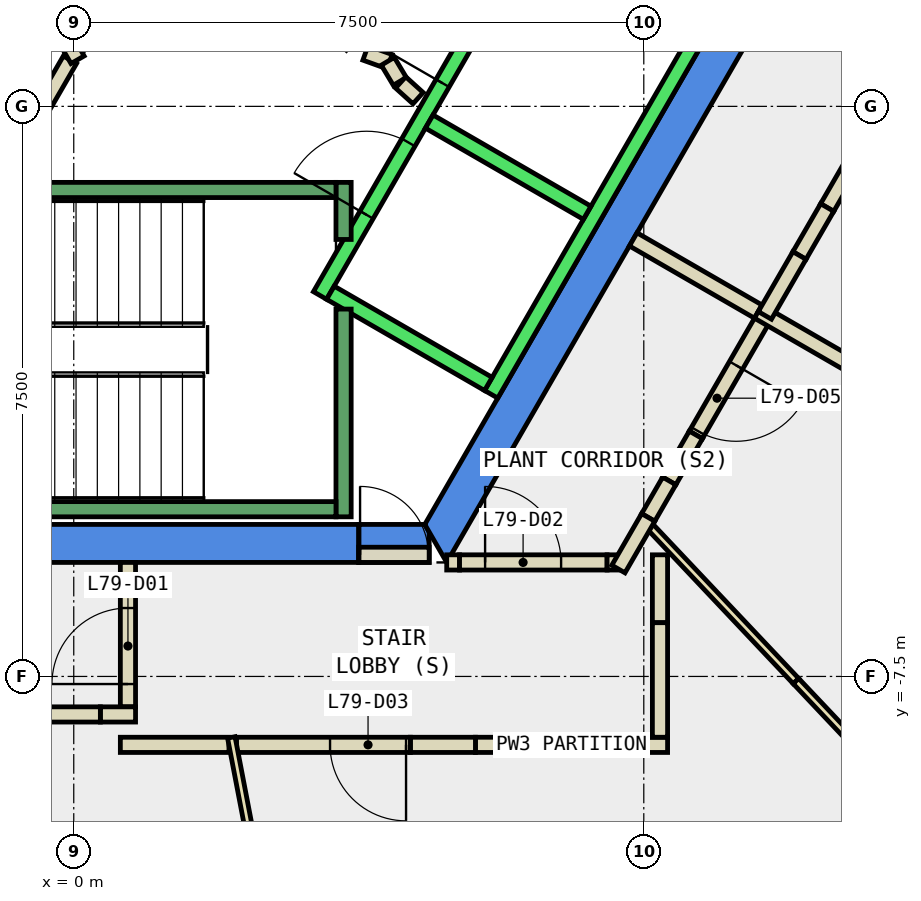
"""IFC4 building model, lengths in metres.
Left out: names, types, materials, properties, quantities, classifications, styles, units other than length and angle.
Written with IfcOpenShell. Run it as: python <this file> out.ifc"""

import sys

from ifc_helpers import new_model, si_unit, direction, frame, frame_2d, origin, place, context, subcontext, project, spatial, polyline, rectangle, outline, extrude, element, fill, save


model = new_model("IFC4")
c1 = context("Model", 3, precision=1e-05, world=origin(), true_north=direction((0.0, 1.0)))
c2 = subcontext(c1, "Body", "Model", "MODEL_VIEW")
j1 = project(units=[si_unit("LENGTHUNIT", "METRE"), si_unit("PLANEANGLEUNIT", "RADIAN")], contexts=[c1])
p1 = place(None, origin())
s1 = spatial("IfcSite", under=j1, at=p1, CompositionType="ELEMENT")
p2 = place(p1, origin())
s2 = spatial("IfcBuilding", under=s1, at=p2, CompositionType="ELEMENT")
p3 = place(p2, frame((0.0, 0.0, 335.9)))
s3 = spatial("IfcBuildingStorey", under=s2, at=p3, CompositionType="ELEMENT", Elevation=335.9)
p4 = place(p3, frame((0.0, 0.0, -0.35)))
e1 = element("IfcWall", 1, at=p4, inside=s3, PredefinedType="SHEAR", context=c2, shape_type="SweptSolid", body=[
    extrude(outline(polyline([(3.75, -6.0), (3.75, -5.5), (-4.619, -5.5), (-4.907, -6.0), (3.75, -6.0)])), origin(), (0.0, 0.0, 1.0), 4.4),
])
p5 = place(p3, frame((0.0, 0.0, 3.6)))
e2 = element("IfcWall", 2, at=p5, inside=s3, PredefinedType="SHEAR", context=c2, shape_type="SweptSolid", body=[
    extrude(outline(polyline([(4.676, -6.0), (4.676, -5.6), (4.619, -5.5), (3.75, -5.5), (3.75, -6.0), (4.676, -6.0)])), origin(), (0.0, 0.0, 1.0), 0.45),
])
p6 = place(p3, frame((0.0, 0.0, -0.35)))
e3 = element("IfcWall", 3, at=p6, inside=s3, PredefinedType="SHEAR", context=c2, shape_type="SweptSolid", body=[
    extrude(outline(polyline([(4.907, -6.0), (9.815, 2.5), (9.238, 2.5), (4.619, -5.5), (4.907, -6.0)])), origin(), (0.0, 0.0, 1.0), 4.4),
])
p7 = place(p3, frame((-0.982, -1.0, 0.0), z_axis=(0.0, 0.0, 1.0), x_axis=(0.50024047865, 0.865886518847, 0.0)))
e4 = element("IfcWall", 4, at=p7, inside=s3, PredefinedType="PARTITIONING", context=c2, shape_type="SweptSolid", body=[
    extrude(rectangle(XDim=1.863, YDim=0.2, at=frame_2d((0.931, 0.0))), origin(), (0.0, 0.0, 1.0), 4.05),
])
p8 = place(p3, frame((3.838, 0.702, 0.0), z_axis=(0.0, 0.0, 1.0), x_axis=(0.941035081519, -0.338308993895, 0.0)))
e5 = element("IfcWall", 5, at=p8, inside=s3, PredefinedType="PARTITIONING", context=c2, shape_type="SweptSolid", body=[
    extrude(rectangle(XDim=0.337, YDim=0.2, at=frame_2d((0.168, 0.0))), origin(), (0.0, 0.0, 1.0), 4.05),
])
p9 = place(p3, frame((4.132, 0.593, 0.0), z_axis=(0.0, 0.0, 1.0), x_axis=(0.513561617048, -0.858052717201, 0.0)))
e6 = element("IfcWall", 6, at=p9, inside=s3, PredefinedType="PARTITIONING", context=c2, shape_type="SweptSolid", body=[
    extrude(rectangle(XDim=0.308, YDim=0.2, at=frame_2d((0.154, 0.0))), origin(), (0.0, 0.0, 1.0), 4.05),
])
p10 = place(p3, frame((4.301, 0.315, 0.0), z_axis=(0.0, 0.0, 1.0), x_axis=(0.741798017506, -0.670623367639, 0.0)))
e7 = element("IfcWall", 7, at=p10, inside=s3, PredefinedType="PARTITIONING", context=c2, shape_type="SweptSolid", body=[
    extrude(rectangle(XDim=0.309, YDim=0.2, at=frame_2d((0.154, 0.0))), origin(), (0.0, 0.0, 1.0), 4.05),
])
p11 = place(p3, frame((-2.54, 5.1, 0.0), z_axis=(0.0, 0.0, 1.0), x_axis=(0.499925051871, -0.866068670783, 0.0)))
e8 = element("IfcWall", 8, at=p11, inside=s3, PredefinedType="PARTITIONING", context=c2, shape_type="SweptSolid", body=[
    extrude(rectangle(XDim=5.181, YDim=0.2, at=frame_2d((2.59, 0.0))), origin(), (0.0, 0.0, 1.0), 4.05),
])
p12 = place(p11, frame((2.04, 0.0, 0.0)))
e9 = element("IfcOpeningElement", 9, at=p12, cuts=e8, PredefinedType="OPENING", context=c2, shape_type="SweptSolid", body=[
    extrude(rectangle(XDim=1.0, YDim=2.1, at=frame_2d((0.5, 1.05))), frame((0.0, 0.11, 0.0), z_axis=(0.0, -1.0, 0.0), x_axis=(1.0, 0.0, 0.0)), (0.0, 0.0, 1.0), 0.22),
])
p13 = place(p3, frame((0.713, -7.9, 0.0), z_axis=(0.0, 0.0, 1.0), x_axis=(0.0, 1.0, 0.0)))
e10 = element("IfcWall", 10, at=p13, inside=s3, PredefinedType="PARTITIONING", context=c2, shape_type="SweptSolid", body=[
    extrude(rectangle(XDim=1.9, YDim=0.2, at=frame_2d((0.95, 0.0))), origin(), (0.0, 0.0, 1.0), 4.05),
])
p14 = place(p13, frame((0.3, 0.0, 0.0)))
e11 = element("IfcOpeningElement", 11, at=p14, cuts=e10, PredefinedType="OPENING", context=c2, shape_type="SweptSolid", body=[
    extrude(rectangle(XDim=1.0, YDim=2.1, at=frame_2d((0.5, 1.05))), frame((0.0, 0.11, 0.0), z_axis=(0.0, -1.0, 0.0), x_axis=(1.0, 0.0, 0.0)), (0.0, 0.0, 1.0), 0.22),
])
p15 = place(p3, frame((4.907, -6.0, 0.0), z_axis=(0.0, 0.0, 1.0), x_axis=(1.0, 0.0, 0.0)))
e12 = element("IfcWall", 12, at=p15, inside=s3, PredefinedType="PARTITIONING", context=c2, shape_type="SweptSolid", body=[
    extrude(rectangle(XDim=0.169, YDim=0.2, at=frame_2d((0.084, 0.0))), origin(), (0.0, 0.0, 1.0), 2.4),
])
p16 = place(p3, frame((7.813, -8.4, 0.0), z_axis=(0.0, 0.0, 1.0), x_axis=(-1.0, 0.0, 0.0)))
e13 = element("IfcWall", 13, at=p16, inside=s3, PredefinedType="PARTITIONING", context=c2, shape_type="SweptSolid", body=[
    extrude(rectangle(XDim=2.528, YDim=0.2, at=frame_2d((1.264, 0.0))), origin(), (0.0, 0.0, 1.0), 4.05),
])
p17 = place(p3, frame((7.713, -5.9, 0.0), z_axis=(0.0, 0.0, 1.0), x_axis=(0.0, -1.0, 0.0)))
e14 = element("IfcWall", 14, at=p17, inside=s3, PredefinedType="PARTITIONING", context=c2, shape_type="SweptSolid", body=[
    extrude(rectangle(XDim=0.893, YDim=0.2, at=frame_2d((0.447, 0.0))), origin(), (0.0, 0.0, 1.0), 1.95),
])
p18 = place(p3, frame((2.042, -8.4, 0.0), z_axis=(0.0, 0.0, 1.0), x_axis=(-1.0, 0.0, 0.0)))
e15 = element("IfcWall", 15, at=p18, inside=s3, PredefinedType="PARTITIONING", context=c2, shape_type="SweptSolid", body=[
    extrude(rectangle(XDim=1.429, YDim=0.2, at=frame_2d((0.714, 0.0))), origin(), (0.0, 0.0, 1.0), 4.05),
])
p19 = place(p3, frame((0.813, -8.0, 0.0), z_axis=(0.0, 0.0, 1.0), x_axis=(-1.0, 0.0, 0.0)))
e16 = element("IfcWall", 16, at=p19, inside=s3, PredefinedType="PARTITIONING", context=c2, shape_type="SweptSolid", body=[
    extrude(rectangle(XDim=0.463, YDim=0.2, at=frame_2d((0.231, 0.0))), origin(), (0.0, 0.0, 1.0), 4.05),
])
p20 = place(p3, frame((9.093, -2.75, 0.0), z_axis=(0.0, 0.0, 1.0), x_axis=(-0.500145398563, -0.865941441609, 0.0)))
e17 = element("IfcWall", 17, at=p20, inside=s3, PredefinedType="PARTITIONING", context=c2, shape_type="SweptSolid", body=[
    extrude(rectangle(XDim=1.815, YDim=0.2, at=frame_2d((0.908, 0.0))), origin(), (0.0, 0.0, 1.0), 4.05),
])
p21 = place(p20, frame((0.758, 0.0, 0.0)))
e18 = element("IfcOpeningElement", 18, at=p21, cuts=e17, PredefinedType="OPENING", context=c2, shape_type="SweptSolid", body=[
    extrude(rectangle(XDim=1.0, YDim=2.1, at=frame_2d((0.5, 1.05))), frame((0.0, 0.11, 0.0), z_axis=(0.0, -1.0, 0.0), x_axis=(1.0, 0.0, 0.0)), (0.0, 0.0, 1.0), 0.22),
])
p22 = place(p3, frame((7.361, -1.75, 0.0), z_axis=(0.0, 0.0, 1.0), x_axis=(0.865980106173, -0.500078449558, 0.0)))
e19 = element("IfcWall", 19, at=p22, inside=s3, PredefinedType="PARTITIONING", context=c2, shape_type="SweptSolid", body=[
    extrude(rectangle(XDim=1.9, YDim=0.2, at=frame_2d((0.95, 0.0))), origin(), (0.0, 0.0, 1.0), 4.05),
])
p23 = place(p3, frame((7.524, -5.467, 0.0), z_axis=(0.0, 0.0, 1.0), x_axis=(0.686690726235, -0.726949686363, 0.0)))
e20 = element("IfcWall", 20, at=p23, inside=s3, PredefinedType="PARTITIONING", context=c2, shape_type="SweptSolid", body=[
    extrude(rectangle(XDim=2.881, YDim=0.1, at=frame_2d((1.44, 0.0))), origin(), (0.0, 0.0, 1.0), 1.95),
])
p24 = place(p3, frame((9.006, -2.7, 0.0), z_axis=(0.0, 0.0, 1.0), x_axis=(0.86601643423, -0.500015535402, 0.0)))
e21 = element("IfcWall", 21, at=p24, inside=s3, PredefinedType="PARTITIONING", context=c2, shape_type="SweptSolid", body=[
    extrude(rectangle(XDim=13.147, YDim=0.2, at=frame_2d((6.574, 0.0))), origin(), (0.0, 0.0, 1.0), 4.05),
])
p25 = place(p3, frame((3.75, -5.9, 0.0), z_axis=(0.0, 0.0, 1.0), x_axis=(1.0, 0.0, 0.0)))
e22 = element("IfcWall", 22, at=p25, inside=s3, PredefinedType="PARTITIONING", context=c2, shape_type="SweptSolid", body=[
    extrude(rectangle(XDim=0.926, YDim=0.2, at=frame_2d((0.463, 0.0))), origin(), (0.0, 0.0, 1.0), 2.4),
])
p26 = place(p25, frame((0.017, 0.0, 0.0)))
e23 = element("IfcOpeningElement", 23, at=p26, cuts=e22, PredefinedType="OPENING", context=c2, shape_type="SweptSolid", body=[
    extrude(rectangle(XDim=0.9, YDim=2.1, at=frame_2d((0.45, 1.05))), frame((0.0, 0.11, 0.0), z_axis=(0.0, -1.0, 0.0), x_axis=(1.0, 0.0, 0.0)), (0.0, 0.0, 1.0), 0.22),
])
p27 = place(p3, frame((5.076, -6.0, 0.0), z_axis=(0.0, 0.0, 1.0), x_axis=(1.0, 0.0, 0.0)))
e24 = element("IfcWall", 24, at=p27, inside=s3, PredefinedType="PARTITIONING", context=c2, shape_type="SweptSolid", body=[
    extrude(rectangle(XDim=1.941, YDim=0.2, at=frame_2d((0.971, 0.0))), origin(), (0.0, 0.0, 1.0), 4.05),
])
p28 = place(p27, frame((0.336, 0.0, 0.0)))
e25 = element("IfcOpeningElement", 25, at=p28, cuts=e24, PredefinedType="OPENING", context=c2, shape_type="SweptSolid", body=[
    extrude(rectangle(XDim=1.0, YDim=2.1, at=frame_2d((0.5, 1.05))), frame((0.0, 0.11, 0.0), z_axis=(0.0, -1.0, 0.0), x_axis=(1.0, 0.0, 0.0)), (0.0, 0.0, 1.0), 0.22),
])
p29 = place(p3, frame((7.017, -6.0, 0.0), z_axis=(0.0, 0.0, 1.0), x_axis=(1.0, 0.0, 0.0)))
e26 = element("IfcWall", 26, at=p29, inside=s3, PredefinedType="PARTITIONING", context=c2, shape_type="SweptSolid", body=[
    extrude(rectangle(XDim=0.144, YDim=0.2, at=frame_2d((0.072, 0.0))), origin(), (0.0, 0.0, 1.0), 1.95),
])
p30 = place(p3, frame((5.285, -8.4, 0.0), z_axis=(0.0, 0.0, 1.0), x_axis=(-1.0, 0.0, 0.0)))
e27 = element("IfcWall", 27, at=p30, inside=s3, PredefinedType="PARTITIONING", context=c2, shape_type="SweptSolid", body=[
    extrude(rectangle(XDim=0.856, YDim=0.2, at=frame_2d((0.428, 0.0))), origin(), (0.0, 0.0, 1.0), 1.95),
])
p31 = place(p3, frame((4.429, -8.4, 0.0), z_axis=(0.0, 0.0, 1.0), x_axis=(-1.0, 0.0, 0.0)))
e28 = element("IfcWall", 28, at=p31, inside=s3, PredefinedType="PARTITIONING", context=c2, shape_type="SweptSolid", body=[
    extrude(rectangle(XDim=2.287, YDim=0.2, at=frame_2d((1.144, 0.0))), origin(), (0.0, 0.0, 1.0), 4.05),
])
p32 = place(p31, frame((0.057, 0.0, 0.0)))
e29 = element("IfcOpeningElement", 29, at=p32, cuts=e28, PredefinedType="OPENING", context=c2, shape_type="SweptSolid", body=[
    extrude(rectangle(XDim=1.0, YDim=2.1, at=frame_2d((0.5, 1.05))), frame((0.0, 0.11, 0.0), z_axis=(0.0, -1.0, 0.0), x_axis=(1.0, 0.0, 0.0)), (0.0, 0.0, 1.0), 0.22),
])
p33 = place(p3, frame((7.713, -6.793, 0.0), z_axis=(0.0, 0.0, 1.0), x_axis=(0.0, -1.0, 0.0)))
e30 = element("IfcWall", 30, at=p33, inside=s3, PredefinedType="PARTITIONING", context=c2, shape_type="SweptSolid", body=[
    extrude(rectangle(XDim=1.507, YDim=0.2, at=frame_2d((0.753, 0.0))), origin(), (0.0, 0.0, 1.0), 4.05),
])
p34 = place(p3, frame((0.35, -8.0, 0.0), z_axis=(0.0, 0.0, 1.0), x_axis=(-1.0, 0.0, 0.0)))
e31 = element("IfcWall", 31, at=p34, inside=s3, PredefinedType="PARTITIONING", context=c2, shape_type="SweptSolid", body=[
    extrude(rectangle(XDim=0.7, YDim=0.2, at=frame_2d((0.35, 0.0))), origin(), (0.0, 0.0, 1.0), 1.95),
])
p35 = place(p3, frame((8.185, -4.322, 0.0), z_axis=(0.0, 0.0, 1.0), x_axis=(-0.500265973451, -0.865871789474, 0.0)))
e32 = element("IfcWall", 32, at=p35, inside=s3, PredefinedType="PARTITIONING", context=c2, shape_type="SweptSolid", body=[
    extrude(rectangle(XDim=0.7, YDim=0.2, at=frame_2d((0.35, 0.0))), origin(), (0.0, 0.0, 1.0), 1.95),
])
p36 = place(p3, frame((7.835, -4.928, 0.0), z_axis=(0.0, 0.0, 1.0), x_axis=(-0.499646164767, -0.866229594296, 0.0)))
e33 = element("IfcWall", 33, at=p36, inside=s3, PredefinedType="PARTITIONING", context=c2, shape_type="SweptSolid", body=[
    extrude(rectangle(XDim=0.554, YDim=0.2, at=frame_2d((0.277, 0.0))), origin(), (0.0, 0.0, 1.0), 4.05),
])
p37 = place(p3, frame((7.558, -5.408, 0.0), z_axis=(0.0, 0.0, 1.0), x_axis=(-0.500090821976, -0.865972961342, 0.0)))
e34 = element("IfcWall", 34, at=p37, inside=s3, PredefinedType="PARTITIONING", context=c2, shape_type="SweptSolid", body=[
    extrude(rectangle(XDim=0.784, YDim=0.2, at=frame_2d((0.392, 0.0))), origin(), (0.0, 0.0, 1.0), 1.95),
])
p38 = place(p3, frame((3.388, -15.153, 0.0), z_axis=(0.0, 0.0, 1.0), x_axis=(-0.18849172388, 0.982074778227, 0.0)))
e35 = element("IfcWall", 35, at=p38, inside=s3, PredefinedType="PARTITIONING", context=c2, shape_type="SweptSolid", body=[
    extrude(rectangle(XDim=6.976, YDim=0.1, at=frame_2d((3.488, 0.0))), origin(), (0.0, 0.0, 1.0), 4.05),
])
p39 = place(p3, frame((9.502, -7.561, 0.0), z_axis=(0.0, 0.0, 1.0), x_axis=(0.686701951344, -0.726939082744, 0.0)))
e36 = element("IfcWall", 36, at=p39, inside=s3, PredefinedType="PARTITIONING", context=c2, shape_type="SweptSolid", body=[
    extrude(rectangle(XDim=9.69, YDim=0.1, at=frame_2d((4.845, 0.0))), origin(), (0.0, 0.0, 1.0), 4.05),
])
p40 = place(p3, frame((11.138, 0.792, 0.0), z_axis=(0.0, 0.0, 1.0), x_axis=(-0.499728202161, -0.866182269482, 0.0)))
e37 = element("IfcWall", 37, at=p40, inside=s3, PredefinedType="PARTITIONING", context=c2, shape_type="SweptSolid", body=[
    extrude(rectangle(XDim=2.451, YDim=0.2, at=frame_2d((1.226, 0.0))), origin(), (0.0, 0.0, 1.0), 4.05),
])
p41 = place(p3, frame((9.913, -1.331, 0.0), z_axis=(0.0, 0.0, 1.0), x_axis=(-0.500785366854, -0.865571496957, 0.0)))
e38 = element("IfcWall", 38, at=p41, inside=s3, PredefinedType="PARTITIONING", context=c2, shape_type="SweptSolid", body=[
    extrude(rectangle(XDim=0.729, YDim=0.2, at=frame_2d((0.364, 0.0))), origin(), (0.0, 0.0, 1.0), 1.95),
])
p42 = place(p3, frame((9.548, -1.962, 0.0), z_axis=(0.0, 0.0, 1.0), x_axis=(-0.500063042646, -0.865989003036, 0.0)))
e39 = element("IfcWall", 39, at=p42, inside=s3, PredefinedType="PARTITIONING", context=c2, shape_type="SweptSolid", body=[
    extrude(rectangle(XDim=0.91, YDim=0.2, at=frame_2d((0.455, 0.0))), origin(), (0.0, 0.0, 1.0), 4.05),
])
p43 = place(p3, frame((3.24, -2.488, 0.0), z_axis=(0.0, 0.0, 1.0), x_axis=(0.500034260056, 0.866005622828, 0.0)))
e40 = element("IfcWall", 40, at=p43, inside=s3, PredefinedType="STANDARD", context=c2, shape_type="SweptSolid", body=[
    extrude(rectangle(XDim=5.399, YDim=0.2, at=frame_2d((2.7, 0.0))), origin(), (0.0, 0.0, 1.0), 4.05),
])
p44 = place(p43, frame((3.225, 0.0, 0.0)))
e41 = element("IfcOpeningElement", 41, at=p44, cuts=e40, PredefinedType="OPENING", context=c2, shape_type="SweptSolid", body=[
    extrude(rectangle(XDim=1.1, YDim=2.1, at=frame_2d((0.55, 1.05))), frame((0.0, 0.11, 0.0), z_axis=(0.0, -1.0, 0.0), x_axis=(1.0, 0.0, 0.0)), (0.0, 0.0, 1.0), 0.22),
])
p45 = place(p43, frame((1.225, 0.0, 0.0)))
e42 = element("IfcOpeningElement", 42, at=p45, cuts=e40, PredefinedType="OPENING", context=c2, shape_type="SweptSolid", body=[
    extrude(rectangle(XDim=1.1, YDim=2.1, at=frame_2d((0.55, 1.05))), frame((0.0, 0.11, 0.0), z_axis=(0.0, -1.0, 0.0), x_axis=(1.0, 0.0, 0.0)), (0.0, 0.0, 1.0), 0.22),
])
p46 = place(p3, frame((5.492, -3.788, 0.0), z_axis=(0.0, 0.0, 1.0), x_axis=(0.500034260056, 0.866005622828, 0.0)))
e43 = element("IfcWall", 43, at=p46, inside=s3, PredefinedType="STANDARD", context=c2, shape_type="SweptSolid", body=[
    extrude(rectangle(XDim=5.399, YDim=0.2, at=frame_2d((2.7, 0.0))), origin(), (0.0, 0.0, 1.0), 4.05),
])
p47 = place(p3, frame((3.377, -2.452, 0.0), z_axis=(0.0, 0.0, 1.0), x_axis=(0.865955154139, -0.50012165622, 0.0)))
e44 = element("IfcWall", 44, at=p47, inside=s3, PredefinedType="STANDARD", context=c2, shape_type="SweptSolid", body=[
    extrude(rectangle(XDim=2.4, YDim=0.2, at=frame_2d((1.2, 0.0))), origin(), (0.0, 0.0, 1.0), 4.05),
])
p48 = place(p3, frame((4.677, -0.2, 0.0), z_axis=(0.0, 0.0, 1.0), x_axis=(0.865973769406, -0.500089422704, 0.0)))
e45 = element("IfcWall", 45, at=p48, inside=s3, PredefinedType="STANDARD", context=c2, shape_type="SweptSolid", body=[
    extrude(rectangle(XDim=2.399, YDim=0.2, at=frame_2d((1.2, 0.0))), origin(), (0.0, 0.0, 1.0), 4.05),
])
p49 = place(p3, frame((3.55, -2.667, 0.0), z_axis=(0.0, 0.0, 1.0), x_axis=(0.0, -1.0, 0.0)))
e46 = element("IfcWall", 46, at=p49, inside=s3, PredefinedType="STANDARD", context=c2, shape_type="SweptSolid", body=[
    extrude(rectangle(XDim=2.733, YDim=0.2, at=frame_2d((1.366, 0.0))), origin(), (0.0, 0.0, 1.0), 4.05),
])
p50 = place(p3, frame((3.55, -1.0, 0.0), z_axis=(0.0, 0.0, 1.0), x_axis=(0.0, -1.0, 0.0)))
e47 = element("IfcWall", 47, at=p50, inside=s3, PredefinedType="STANDARD", context=c2, shape_type="SweptSolid", body=[
    extrude(rectangle(XDim=0.751, YDim=0.2, at=frame_2d((0.375, 0.0))), origin(), (0.0, 0.0, 1.0), 4.05),
])
p51 = place(p3, frame((-3.45, -1.1, 0.0), z_axis=(0.0, 0.0, 1.0), x_axis=(1.0, 0.0, 0.0)))
e48 = element("IfcWall", 48, at=p51, inside=s3, PredefinedType="STANDARD", context=c2, shape_type="SweptSolid", body=[
    extrude(rectangle(XDim=6.9, YDim=0.2, at=frame_2d((3.45, 0.0))), origin(), (0.0, 0.0, 1.0), 4.05),
])
p52 = place(p51, frame((0.45, 0.0, 0.0)))
e49 = element("IfcOpeningElement", 49, at=p52, cuts=e48, PredefinedType="OPENING", context=c2, shape_type="SweptSolid", body=[
    extrude(rectangle(XDim=1.1, YDim=2.2, at=frame_2d((0.55, 1.1))), frame((0.0, 0.11, 0.0), z_axis=(0.0, -1.0, 0.0), x_axis=(1.0, 0.0, 0.0)), (0.0, 0.0, 1.0), 0.22),
])
p53 = place(p3, frame((-3.45, -5.3, 0.0), z_axis=(0.0, 0.0, 1.0), x_axis=(1.0, 0.0, 0.0)))
e50 = element("IfcWall", 50, at=p53, inside=s3, PredefinedType="STANDARD", context=c2, shape_type="SweptSolid", body=[
    extrude(rectangle(XDim=6.9, YDim=0.2, at=frame_2d((3.45, 0.0))), origin(), (0.0, 0.0, 1.0), 4.05),
])
p54 = place(p14, origin())
e51 = element("IfcDoor", 51, at=p54, inside=s3, OperationType="SINGLE_SWING_LEFT", PredefinedType="DOOR", context=c2, shape_type="SweptSolid", body=[
    extrude(rectangle(XDim=1.0, YDim=2.1, at=frame_2d((0.5, 1.05))), frame((0.0, 0.025, 0.0), z_axis=(0.0, -1.0, 0.0), x_axis=(1.0, 0.0, 0.0)), (0.0, 0.0, 1.0), 0.05),
])
fill(e11, e51)
p55 = place(p28, origin())
e52 = element("IfcDoor", 52, at=p55, inside=s3, OperationType="SINGLE_SWING_RIGHT", PredefinedType="DOOR", context=c2, shape_type="SweptSolid", body=[
    extrude(rectangle(XDim=1.0, YDim=2.1, at=frame_2d((0.5, 1.05))), frame((0.0, 0.025, 0.0), z_axis=(0.0, -1.0, 0.0), x_axis=(1.0, 0.0, 0.0)), (0.0, 0.0, 1.0), 0.05),
])
fill(e25, e52)
p56 = place(p32, origin())
e53 = element("IfcDoor", 53, at=p56, inside=s3, OperationType="SINGLE_SWING_LEFT", PredefinedType="DOOR", context=c2, shape_type="SweptSolid", body=[
    extrude(rectangle(XDim=1.0, YDim=2.1, at=frame_2d((0.5, 1.05))), frame((0.0, 0.025, 0.0), z_axis=(0.0, -1.0, 0.0), x_axis=(1.0, 0.0, 0.0)), (0.0, 0.0, 1.0), 0.05),
])
fill(e29, e53)
p57 = place(p21, origin())
e54 = element("IfcDoor", 54, at=p57, inside=s3, OperationType="SINGLE_SWING_LEFT", PredefinedType="DOOR", context=c2, shape_type="SweptSolid", body=[
    extrude(rectangle(XDim=1.0, YDim=2.1, at=frame_2d((0.5, 1.05))), frame((0.0, 0.025, 0.0), z_axis=(0.0, -1.0, 0.0), x_axis=(1.0, 0.0, 0.0)), (0.0, 0.0, 1.0), 0.05),
])
fill(e18, e54)
p58 = place(p26, origin())
e55 = element("IfcDoor", 55, at=p58, inside=s3, OperationType="SINGLE_SWING_LEFT", PredefinedType="DOOR", context=c2, shape_type="SweptSolid", body=[
    extrude(rectangle(XDim=0.9, YDim=2.1, at=frame_2d((0.45, 1.05))), frame((0.0, 0.025, 0.0), z_axis=(0.0, -1.0, 0.0), x_axis=(1.0, 0.0, 0.0)), (0.0, 0.0, 1.0), 0.05),
])
fill(e23, e55)
p59 = place(p44, origin())
e56 = element("IfcDoor", 56, at=p59, inside=s3, OperationType="SLIDING_TO_LEFT", PredefinedType="DOOR", context=c2, shape_type="SweptSolid", body=[
    extrude(rectangle(XDim=1.1, YDim=2.1, at=frame_2d((0.55, 1.05))), frame((0.0, 0.025, 0.0), z_axis=(0.0, -1.0, 0.0), x_axis=(1.0, 0.0, 0.0)), (0.0, 0.0, 1.0), 0.05),
])
fill(e41, e56)
p60 = place(p45, origin())
e57 = element("IfcDoor", 57, at=p60, inside=s3, OperationType="SLIDING_TO_LEFT", PredefinedType="DOOR", context=c2, shape_type="SweptSolid", body=[
    extrude(rectangle(XDim=1.1, YDim=2.1, at=frame_2d((0.55, 1.05))), frame((0.0, 0.025, 0.0), z_axis=(0.0, -1.0, 0.0), x_axis=(1.0, 0.0, 0.0)), (0.0, 0.0, 1.0), 0.05),
])
fill(e42, e57)
save(model, sys.argv[1])
